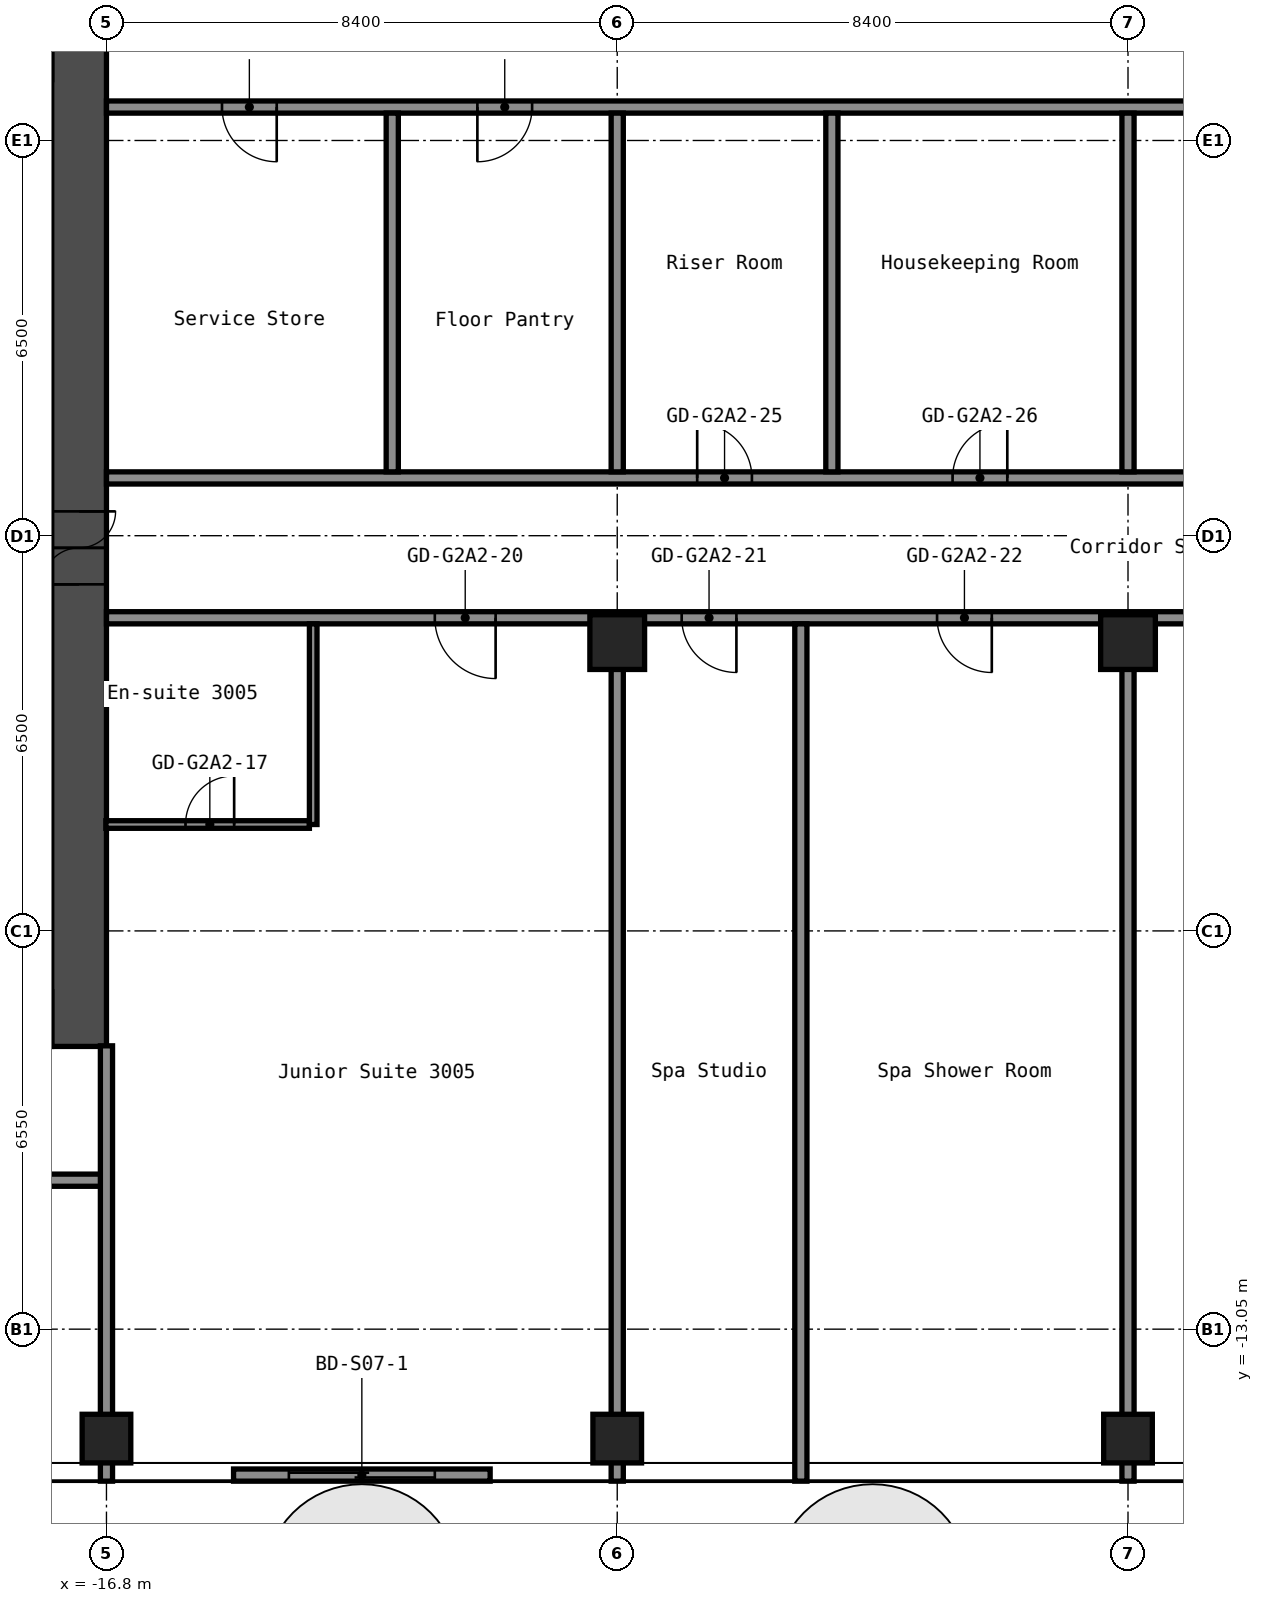
"""IFC4 building model, lengths in metres.
Left out: names, types, materials, properties, quantities, classifications, styles, units other than length and angle.
Written with IfcOpenShell. Run it as: python <this file> out.ifc"""

import sys

from ifc_helpers import new_model, si_unit, direction, frame, frame_2d, origin, origin_2d, place, context, subcontext, project, spatial, rectangle, hollow_rectangle, extrude, element, fill, save


model = new_model("IFC4")
c1 = context("Model", 3, precision=1e-05, world=origin(), true_north=direction((0.0, 1.0)))
c2 = subcontext(c1, "Body", "Model", "MODEL_VIEW")
j1 = project(units=[si_unit("LENGTHUNIT", "METRE"), si_unit("PLANEANGLEUNIT", "RADIAN")], contexts=[c1])
p1 = place(None, origin())
s1 = spatial("IfcSite", under=j1, at=p1, CompositionType="ELEMENT")
p2 = place(p1, origin())
s2 = spatial("IfcBuilding", under=s1, at=p2, CompositionType="ELEMENT")
p3 = place(p2, frame((0.0, 0.0, 107.4)))
s3 = spatial("IfcBuildingStorey", under=s2, at=p3, CompositionType="ELEMENT", Elevation=107.4)
for number, where, z_axis, x_axis in (
    (1, (-16.8, -14.85, 0.0), (0.0, 0.0, 1.0), (1.0, 0.0, 0.0)),
    (2, (-8.4, -14.85, 0.0), (0.0, 0.0, 1.0), (1.0, 0.0, 0.0)),
):
    element("IfcColumn", number, at=place(p3, frame(where, z_axis=z_axis, x_axis=x_axis)), inside=s3, PredefinedType="COLUMN", context=c2, shape_type="SweptSolid", body=[
        extrude(hollow_rectangle(XDim=0.8, YDim=0.8, WallThickness=0.032, at=origin_2d()), origin(), (0.0, 0.0, 1.0), 2.8),
    ])
p4 = place(p3, frame((-8.4, -1.75, 0.0), z_axis=(0.0, 0.0, 1.0), x_axis=(1.0, 0.0, 0.0)))
e3 = element("IfcColumn", 3, at=p4, inside=s3, PredefinedType="COLUMN", context=c2, shape_type="SweptSolid", body=[
    extrude(hollow_rectangle(XDim=0.9, YDim=0.9, WallThickness=0.036, at=origin_2d()), origin(), (0.0, 0.0, 1.0), 2.8),
])
p5 = place(p3, frame((0.0, -14.85, 0.0), z_axis=(0.0, 0.0, 1.0), x_axis=(1.0, 0.0, 0.0)))
e4 = element("IfcColumn", 4, at=p5, inside=s3, PredefinedType="COLUMN", context=c2, shape_type="SweptSolid", body=[
    extrude(hollow_rectangle(XDim=0.8, YDim=0.8, WallThickness=0.032, at=origin_2d()), origin(), (0.0, 0.0, 1.0), 2.8),
])
p6 = place(p3, frame((0.0, -1.75, 0.0), z_axis=(0.0, 0.0, 1.0), x_axis=(1.0, 0.0, 0.0)))
e5 = element("IfcColumn", 5, at=p6, inside=s3, PredefinedType="COLUMN", context=c2, shape_type="SweptSolid", body=[
    extrude(hollow_rectangle(XDim=0.9, YDim=0.9, WallThickness=0.036, at=origin_2d()), origin(), (0.0, 0.0, 1.0), 2.8),
])
p7 = place(p3, frame((-17.25, -8.4, 0.0), z_axis=(0.0, 0.0, 1.0), x_axis=(0.0, 1.0, 0.0)))
e6 = element("IfcWall", 6, at=p7, inside=s3, PredefinedType="SHEAR", context=c2, shape_type="SweptSolid", body=[
    extrude(rectangle(XDim=16.8, YDim=0.9, at=frame_2d((8.4, 0.0))), origin(), (0.0, 0.0, 1.0), 2.8),
])
p8 = place(p7, frame((7.6, 0.0, 0.0)))
e7 = element("IfcOpeningElement", 7, at=p8, cuts=e6, PredefinedType="OPENING", context=c2, shape_type="SweptSolid", body=[
    extrude(rectangle(XDim=1.2, YDim=2.1, at=frame_2d((0.6, 1.05))), frame((0.0, 0.46, 0.0), z_axis=(0.0, -1.0, 0.0), x_axis=(1.0, 0.0, 0.0)), (0.0, 0.0, 1.0), 0.92),
])
p9 = place(p3, frame((-46.5, -10.6, 0.0), z_axis=(0.0, 0.0, 1.0), x_axis=(1.0, 0.0, 0.0)))
e8 = element("IfcWall", 8, at=p9, inside=s3, PredefinedType="PARTITIONING", context=c2, shape_type="SweptSolid", body=[
    extrude(rectangle(XDim=29.7, YDim=0.2, at=frame_2d((14.85, 0.0))), origin(), (0.0, 0.0, 1.0), 2.8),
])
p10 = place(p9, frame((1.95, 0.0, 0.0)))
e9 = element("IfcOpeningElement", 9, at=p10, cuts=e8, PredefinedType="OPENING", context=c2, shape_type="SweptSolid", body=[
    extrude(rectangle(XDim=0.9, YDim=2.1, at=frame_2d((0.45, 1.05))), frame((0.0, 0.11, 0.0), z_axis=(0.0, -1.0, 0.0), x_axis=(1.0, 0.0, 0.0)), (0.0, 0.0, 1.0), 0.22),
])
p11 = place(p9, frame((6.74, 0.0, 0.0)))
e10 = element("IfcOpeningElement", 10, at=p11, cuts=e8, PredefinedType="OPENING", context=c2, shape_type="SweptSolid", body=[
    extrude(rectangle(XDim=0.9, YDim=2.1, at=frame_2d((0.45, 1.05))), frame((0.0, 0.11, 0.0), z_axis=(0.0, -1.0, 0.0), x_axis=(1.0, 0.0, 0.0)), (0.0, 0.0, 1.0), 0.22),
])
p12 = place(p9, frame((10.94, 0.0, 0.0)))
e11 = element("IfcOpeningElement", 11, at=p12, cuts=e8, PredefinedType="OPENING", context=c2, shape_type="SweptSolid", body=[
    extrude(rectangle(XDim=0.9, YDim=2.1, at=frame_2d((0.45, 1.05))), frame((0.0, 0.11, 0.0), z_axis=(0.0, -1.0, 0.0), x_axis=(1.0, 0.0, 0.0)), (0.0, 0.0, 1.0), 0.22),
])
p13 = place(p9, frame((15.055, 0.0, 0.0)))
e12 = element("IfcOpeningElement", 12, at=p13, cuts=e8, PredefinedType="OPENING", context=c2, shape_type="SweptSolid", body=[
    extrude(rectangle(XDim=0.9, YDim=2.1, at=frame_2d((0.45, 1.05))), frame((0.0, 0.11, 0.0), z_axis=(0.0, -1.0, 0.0), x_axis=(1.0, 0.0, 0.0)), (0.0, 0.0, 1.0), 0.22),
])
p14 = place(p9, frame((19.255, 0.0, 0.0)))
e13 = element("IfcOpeningElement", 13, at=p14, cuts=e8, PredefinedType="OPENING", context=c2, shape_type="SweptSolid", body=[
    extrude(rectangle(XDim=0.9, YDim=2.1, at=frame_2d((0.45, 1.05))), frame((0.0, 0.11, 0.0), z_axis=(0.0, -1.0, 0.0), x_axis=(1.0, 0.0, 0.0)), (0.0, 0.0, 1.0), 0.22),
])
p15 = place(p9, frame((25.0, 0.0, 0.0)))
e14 = element("IfcOpeningElement", 14, at=p15, cuts=e8, PredefinedType="OPENING", context=c2, shape_type="SweptSolid", body=[
    extrude(rectangle(XDim=1.0, YDim=2.1, at=frame_2d((0.5, 1.05))), frame((0.0, 0.11, 0.0), z_axis=(0.0, -1.0, 0.0), x_axis=(1.0, 0.0, 0.0)), (0.0, 0.0, 1.0), 0.22),
])
p16 = place(p3, frame((-16.81, -4.75, 0.0), z_axis=(0.0, 0.0, 1.0), x_axis=(1.0, 0.0, 0.0)))
e15 = element("IfcWall", 15, at=p16, inside=s3, PredefinedType="PARTITIONING", context=c2, shape_type="SweptSolid", body=[
    extrude(rectangle(XDim=3.348, YDim=0.125, at=frame_2d((1.674, 0.0))), origin(), (0.0, 0.0, 1.0), 2.8),
])
p17 = place(p16, frame((1.31, 0.0, 0.0)))
e16 = element("IfcOpeningElement", 16, at=p17, cuts=e15, PredefinedType="OPENING", context=c2, shape_type="SweptSolid", body=[
    extrude(rectangle(XDim=0.8, YDim=2.1, at=frame_2d((0.4, 1.05))), frame((0.0, 0.073, 0.0), z_axis=(0.0, -1.0, 0.0), x_axis=(1.0, 0.0, 0.0)), (0.0, 0.0, 1.0), 0.145),
])
p18 = place(p3, frame((-16.8, -1.35, 0.0), z_axis=(0.0, 0.0, 1.0), x_axis=(1.0, 0.0, 0.0)))
e17 = element("IfcWall", 17, at=p18, inside=s3, PredefinedType="PARTITIONING", context=c2, shape_type="SweptSolid", body=[
    extrude(rectangle(XDim=33.6, YDim=0.2, at=frame_2d((16.8, 0.0))), origin(), (0.0, 0.0, 1.0), 2.8),
])
p19 = place(p18, frame((5.4, 0.0, 0.0)))
e18 = element("IfcOpeningElement", 18, at=p19, cuts=e17, PredefinedType="OPENING", context=c2, shape_type="SweptSolid", body=[
    extrude(rectangle(XDim=1.0, YDim=2.1, at=frame_2d((0.5, 1.05))), frame((0.0, 0.11, 0.0), z_axis=(0.0, -1.0, 0.0), x_axis=(1.0, 0.0, 0.0)), (0.0, 0.0, 1.0), 0.22),
])
p20 = place(p18, frame((9.46, 0.0, 0.0)))
e19 = element("IfcOpeningElement", 19, at=p20, cuts=e17, PredefinedType="OPENING", context=c2, shape_type="SweptSolid", body=[
    extrude(rectangle(XDim=0.9, YDim=2.1, at=frame_2d((0.45, 1.05))), frame((0.0, 0.11, 0.0), z_axis=(0.0, -1.0, 0.0), x_axis=(1.0, 0.0, 0.0)), (0.0, 0.0, 1.0), 0.22),
])
p21 = place(p18, frame((13.66, 0.0, 0.0)))
e20 = element("IfcOpeningElement", 20, at=p21, cuts=e17, PredefinedType="OPENING", context=c2, shape_type="SweptSolid", body=[
    extrude(rectangle(XDim=0.9, YDim=2.1, at=frame_2d((0.45, 1.05))), frame((0.0, 0.11, 0.0), z_axis=(0.0, -1.0, 0.0), x_axis=(1.0, 0.0, 0.0)), (0.0, 0.0, 1.0), 0.22),
])
p22 = place(p18, frame((18.8, 0.0, 0.0)))
e21 = element("IfcOpeningElement", 21, at=p22, cuts=e17, PredefinedType="OPENING", context=c2, shape_type="SweptSolid", body=[
    extrude(rectangle(XDim=1.0, YDim=2.1, at=frame_2d((0.5, 1.05))), frame((0.0, 0.11, 0.0), z_axis=(0.0, -1.0, 0.0), x_axis=(1.0, 0.0, 0.0)), (0.0, 0.0, 1.0), 0.22),
])
p23 = place(p18, frame((30.6, 0.0, 0.0)))
e22 = element("IfcOpeningElement", 22, at=p23, cuts=e17, PredefinedType="OPENING", context=c2, shape_type="SweptSolid", body=[
    extrude(rectangle(XDim=1.0, YDim=2.1, at=frame_2d((0.5, 1.05))), frame((0.0, 0.11, 0.0), z_axis=(0.0, -1.0, 0.0), x_axis=(1.0, 0.0, 0.0)), (0.0, 0.0, 1.0), 0.22),
])
p24 = place(p3, frame((-16.8, 0.95, 0.0), z_axis=(0.0, 0.0, 1.0), x_axis=(1.0, 0.0, 0.0)))
e23 = element("IfcWall", 23, at=p24, inside=s3, PredefinedType="PARTITIONING", context=c2, shape_type="SweptSolid", body=[
    extrude(rectangle(XDim=33.6, YDim=0.2, at=frame_2d((16.8, 0.0))), origin(), (0.0, 0.0, 1.0), 2.8),
])
p25 = place(p24, frame((9.715, 0.0, 0.0)))
e24 = element("IfcOpeningElement", 24, at=p25, cuts=e23, PredefinedType="OPENING", context=c2, shape_type="SweptSolid", body=[
    extrude(rectangle(XDim=0.9, YDim=2.1, at=frame_2d((0.45, 1.05))), frame((0.0, 0.11, 0.0), z_axis=(0.0, -1.0, 0.0), x_axis=(1.0, 0.0, 0.0)), (0.0, 0.0, 1.0), 0.22),
])
p26 = place(p24, frame((13.915, 0.0, 0.0)))
e25 = element("IfcOpeningElement", 25, at=p26, cuts=e23, PredefinedType="OPENING", context=c2, shape_type="SweptSolid", body=[
    extrude(rectangle(XDim=0.9, YDim=2.1, at=frame_2d((0.45, 1.05))), frame((0.0, 0.11, 0.0), z_axis=(0.0, -1.0, 0.0), x_axis=(1.0, 0.0, 0.0)), (0.0, 0.0, 1.0), 0.22),
])
p27 = place(p24, frame((26.68, 0.0, 0.0)))
e26 = element("IfcOpeningElement", 26, at=p27, cuts=e23, PredefinedType="OPENING", context=c2, shape_type="SweptSolid", body=[
    extrude(rectangle(XDim=0.9, YDim=2.1, at=frame_2d((0.45, 1.05))), frame((0.0, 0.11, 0.0), z_axis=(0.0, -1.0, 0.0), x_axis=(1.0, 0.0, 0.0)), (0.0, 0.0, 1.0), 0.22),
])
p28 = place(p24, frame((30.88, 0.0, 0.0)))
e27 = element("IfcOpeningElement", 27, at=p28, cuts=e23, PredefinedType="OPENING", context=c2, shape_type="SweptSolid", body=[
    extrude(rectangle(XDim=0.9, YDim=2.1, at=frame_2d((0.45, 1.05))), frame((0.0, 0.11, 0.0), z_axis=(0.0, -1.0, 0.0), x_axis=(1.0, 0.0, 0.0)), (0.0, 0.0, 1.0), 0.22),
])
p29 = place(p3, frame((-16.8, 7.05, 0.0), z_axis=(0.0, 0.0, 1.0), x_axis=(1.0, 0.0, 0.0)))
e28 = element("IfcWall", 28, at=p29, inside=s3, PredefinedType="PARTITIONING", context=c2, shape_type="SweptSolid", body=[
    extrude(rectangle(XDim=33.6, YDim=0.2, at=frame_2d((16.8, 0.0))), origin(), (0.0, 0.0, 1.0), 2.8),
])
p30 = place(p29, frame((1.9, 0.0, 0.0)))
e29 = element("IfcOpeningElement", 29, at=p30, cuts=e28, PredefinedType="OPENING", context=c2, shape_type="SweptSolid", body=[
    extrude(rectangle(XDim=0.9, YDim=2.1, at=frame_2d((0.45, 1.05))), frame((0.0, 0.11, 0.0), z_axis=(0.0, -1.0, 0.0), x_axis=(1.0, 0.0, 0.0)), (0.0, 0.0, 1.0), 0.22),
])
p31 = place(p29, frame((6.1, 0.0, 0.0)))
e30 = element("IfcOpeningElement", 30, at=p31, cuts=e28, PredefinedType="OPENING", context=c2, shape_type="SweptSolid", body=[
    extrude(rectangle(XDim=0.9, YDim=2.1, at=frame_2d((0.45, 1.05))), frame((0.0, 0.11, 0.0), z_axis=(0.0, -1.0, 0.0), x_axis=(1.0, 0.0, 0.0)), (0.0, 0.0, 1.0), 0.22),
])
p32 = place(p29, frame((18.87, 0.0, 0.0)))
e31 = element("IfcOpeningElement", 31, at=p32, cuts=e28, PredefinedType="OPENING", context=c2, shape_type="SweptSolid", body=[
    extrude(rectangle(XDim=0.9, YDim=2.1, at=frame_2d((0.45, 1.05))), frame((0.0, 0.11, 0.0), z_axis=(0.0, -1.0, 0.0), x_axis=(1.0, 0.0, 0.0)), (0.0, 0.0, 1.0), 0.22),
])
p33 = place(p29, frame((23.07, 0.0, 0.0)))
e32 = element("IfcOpeningElement", 32, at=p33, cuts=e28, PredefinedType="OPENING", context=c2, shape_type="SweptSolid", body=[
    extrude(rectangle(XDim=0.9, YDim=2.1, at=frame_2d((0.45, 1.05))), frame((0.0, 0.11, 0.0), z_axis=(0.0, -1.0, 0.0), x_axis=(1.0, 0.0, 0.0)), (0.0, 0.0, 1.0), 0.22),
])
p34 = place(p3, frame((-16.8, -15.55, 0.0), z_axis=(0.0, 0.0, 1.0), x_axis=(0.0, 1.0, 0.0)))
e33 = element("IfcWall", 33, at=p34, inside=s3, PredefinedType="PARTITIONING", context=c2, shape_type="SweptSolid", body=[
    extrude(rectangle(XDim=7.16, YDim=0.2, at=frame_2d((3.58, 0.0))), origin(), (0.0, 0.0, 1.0), 2.8),
])
p35 = place(p3, frame((-13.4, -4.75, 0.0), z_axis=(0.0, 0.0, 1.0), x_axis=(0.0, 1.0, 0.0)))
e34 = element("IfcWall", 34, at=p35, inside=s3, PredefinedType="PARTITIONING", context=c2, shape_type="SweptSolid", body=[
    extrude(rectangle(XDim=3.3, YDim=0.125, at=frame_2d((1.65, 0.0))), origin(), (0.0, 0.0, 1.0), 2.8),
])
p36 = place(p3, frame((-12.1, 1.05, 0.0), z_axis=(0.0, 0.0, 1.0), x_axis=(0.0, 1.0, 0.0)))
e35 = element("IfcWall", 35, at=p36, inside=s3, PredefinedType="PARTITIONING", context=c2, shape_type="SweptSolid", body=[
    extrude(rectangle(XDim=5.9, YDim=0.2, at=frame_2d((2.95, 0.0))), origin(), (0.0, 0.0, 1.0), 2.8),
])
p37 = place(p3, frame((-8.4, -15.55, 0.0), z_axis=(0.0, 0.0, 1.0), x_axis=(0.0, 1.0, 0.0)))
e36 = element("IfcWall", 36, at=p37, inside=s3, PredefinedType="PARTITIONING", context=c2, shape_type="SweptSolid", body=[
    extrude(rectangle(XDim=13.36, YDim=0.2, at=frame_2d((6.68, 0.0))), origin(), (0.0, 0.0, 1.0), 2.8),
])
p38 = place(p3, frame((-8.4, 1.05, 0.0), z_axis=(0.0, 0.0, 1.0), x_axis=(0.0, 1.0, 0.0)))
e37 = element("IfcWall", 37, at=p38, inside=s3, PredefinedType="PARTITIONING", context=c2, shape_type="SweptSolid", body=[
    extrude(rectangle(XDim=5.9, YDim=0.2, at=frame_2d((2.95, 0.0))), origin(), (0.0, 0.0, 1.0), 2.8),
])
p39 = place(p3, frame((-5.38, -15.55, 0.0), z_axis=(0.0, 0.0, 1.0), x_axis=(0.0, 1.0, 0.0)))
e38 = element("IfcWall", 38, at=p39, inside=s3, PredefinedType="PARTITIONING", context=c2, shape_type="SweptSolid", body=[
    extrude(rectangle(XDim=14.1, YDim=0.2, at=frame_2d((7.05, 0.0))), origin(), (0.0, 0.0, 1.0), 2.8),
])
p40 = place(p3, frame((-4.87, 1.05, 0.0), z_axis=(0.0, 0.0, 1.0), x_axis=(0.0, 1.0, 0.0)))
e39 = element("IfcWall", 39, at=p40, inside=s3, PredefinedType="PARTITIONING", context=c2, shape_type="SweptSolid", body=[
    extrude(rectangle(XDim=5.9, YDim=0.2, at=frame_2d((2.95, 0.0))), origin(), (0.0, 0.0, 1.0), 2.8),
])
p41 = place(p3, frame((0.0, -15.55, 0.0), z_axis=(0.0, 0.0, 1.0), x_axis=(0.0, 1.0, 0.0)))
e40 = element("IfcWall", 40, at=p41, inside=s3, PredefinedType="PARTITIONING", context=c2, shape_type="SweptSolid", body=[
    extrude(rectangle(XDim=13.36, YDim=0.2, at=frame_2d((6.68, 0.0))), origin(), (0.0, 0.0, 1.0), 2.8),
])
p42 = place(p3, frame((0.0, 1.05, 0.0), z_axis=(0.0, 0.0, 1.0), x_axis=(0.0, 1.0, 0.0)))
e41 = element("IfcWall", 41, at=p42, inside=s3, PredefinedType="PARTITIONING", context=c2, shape_type="SweptSolid", body=[
    extrude(rectangle(XDim=5.9, YDim=0.2, at=frame_2d((2.95, 0.0))), origin(), (0.0, 0.0, 1.0), 2.8),
])
p43 = place(p3, frame((-14.71, -15.45, 0.0), z_axis=(0.0, 0.0, 1.0), x_axis=(1.0, 0.0, 0.0)))
p44 = place(p43, frame((0.91, 0.0, 0.0)))
p45 = place(p44, frame((2.4, 0.0, 0.0), z_axis=(0.0, 0.0, 1.0), x_axis=(-1.0, 0.0, 0.0)))
e42 = element("IfcDoor", 42, at=p45, inside=s3, OperationType="SLIDING_TO_LEFT", PredefinedType="DOOR", context=c2, shape_type="SweptSolid", body=[
    extrude(rectangle(XDim=2.4, YDim=2.2, at=frame_2d((1.2, 1.1))), frame((0.0, 0.025, 0.0), z_axis=(0.0, -1.0, 0.0), x_axis=(1.0, 0.0, 0.0)), (0.0, 0.0, 1.0), 0.05),
])
p46 = place(p8, origin())
e43 = element("IfcDoor", 43, at=p46, inside=s3, OperationType="DOUBLE_DOOR_SINGLE_SWING", PredefinedType="DOOR", context=c2, shape_type="SweptSolid", body=[
    extrude(rectangle(XDim=1.2, YDim=2.1, at=frame_2d((0.6, 1.05))), frame((0.0, 0.025, 0.0), z_axis=(0.0, -1.0, 0.0), x_axis=(1.0, 0.0, 0.0)), (0.0, 0.0, 1.0), 0.05),
])
fill(e7, e43)
p47 = place(p17, origin())
e44 = element("IfcDoor", 44, at=p47, inside=s3, OperationType="SINGLE_SWING_LEFT", PredefinedType="DOOR", context=c2, shape_type="SweptSolid", body=[
    extrude(rectangle(XDim=0.8, YDim=2.1, at=frame_2d((0.4, 1.05))), frame((0.0, 0.025, 0.0), z_axis=(0.0, -1.0, 0.0), x_axis=(1.0, 0.0, 0.0)), (0.0, 0.0, 1.0), 0.05),
])
fill(e16, e44)
p48 = place(p19, origin())
e45 = element("IfcDoor", 45, at=p48, inside=s3, OperationType="SINGLE_SWING_RIGHT", PredefinedType="DOOR", context=c2, shape_type="SweptSolid", body=[
    extrude(rectangle(XDim=1.0, YDim=2.1, at=frame_2d((0.5, 1.05))), frame((0.0, 0.025, 0.0), z_axis=(0.0, -1.0, 0.0), x_axis=(1.0, 0.0, 0.0)), (0.0, 0.0, 1.0), 0.05),
])
fill(e18, e45)
p49 = place(p20, origin())
e46 = element("IfcDoor", 46, at=p49, inside=s3, OperationType="SINGLE_SWING_RIGHT", PredefinedType="DOOR", context=c2, shape_type="SweptSolid", body=[
    extrude(rectangle(XDim=0.9, YDim=2.1, at=frame_2d((0.45, 1.05))), frame((0.0, 0.025, 0.0), z_axis=(0.0, -1.0, 0.0), x_axis=(1.0, 0.0, 0.0)), (0.0, 0.0, 1.0), 0.05),
])
fill(e19, e46)
p50 = place(p21, origin())
e47 = element("IfcDoor", 47, at=p50, inside=s3, OperationType="SINGLE_SWING_RIGHT", PredefinedType="DOOR", context=c2, shape_type="SweptSolid", body=[
    extrude(rectangle(XDim=0.9, YDim=2.1, at=frame_2d((0.45, 1.05))), frame((0.0, 0.025, 0.0), z_axis=(0.0, -1.0, 0.0), x_axis=(1.0, 0.0, 0.0)), (0.0, 0.0, 1.0), 0.05),
])
fill(e20, e47)
p51 = place(p25, origin())
e48 = element("IfcDoor", 48, at=p51, inside=s3, OperationType="SINGLE_SWING_RIGHT", PredefinedType="DOOR", context=c2, shape_type="SweptSolid", body=[
    extrude(rectangle(XDim=0.9, YDim=2.1, at=frame_2d((0.45, 1.05))), frame((0.0, 0.025, 0.0), z_axis=(0.0, -1.0, 0.0), x_axis=(1.0, 0.0, 0.0)), (0.0, 0.0, 1.0), 0.05),
])
fill(e24, e48)
p52 = place(p26, origin())
e49 = element("IfcDoor", 49, at=p52, inside=s3, OperationType="SINGLE_SWING_LEFT", PredefinedType="DOOR", context=c2, shape_type="SweptSolid", body=[
    extrude(rectangle(XDim=0.9, YDim=2.1, at=frame_2d((0.45, 1.05))), frame((0.0, 0.025, 0.0), z_axis=(0.0, -1.0, 0.0), x_axis=(1.0, 0.0, 0.0)), (0.0, 0.0, 1.0), 0.05),
])
fill(e25, e49)
p53 = place(p30, origin())
e50 = element("IfcDoor", 50, at=p53, inside=s3, OperationType="SINGLE_SWING_RIGHT", PredefinedType="DOOR", context=c2, shape_type="SweptSolid", body=[
    extrude(rectangle(XDim=0.9, YDim=2.1, at=frame_2d((0.45, 1.05))), frame((0.0, 0.025, 0.0), z_axis=(0.0, -1.0, 0.0), x_axis=(1.0, 0.0, 0.0)), (0.0, 0.0, 1.0), 0.05),
])
fill(e29, e50)
p54 = place(p31, origin())
e51 = element("IfcDoor", 51, at=p54, inside=s3, OperationType="SINGLE_SWING_LEFT", PredefinedType="DOOR", context=c2, shape_type="SweptSolid", body=[
    extrude(rectangle(XDim=0.9, YDim=2.1, at=frame_2d((0.45, 1.05))), frame((0.0, 0.025, 0.0), z_axis=(0.0, -1.0, 0.0), x_axis=(1.0, 0.0, 0.0)), (0.0, 0.0, 1.0), 0.05),
])
fill(e30, e51)
save(model, sys.argv[1])
